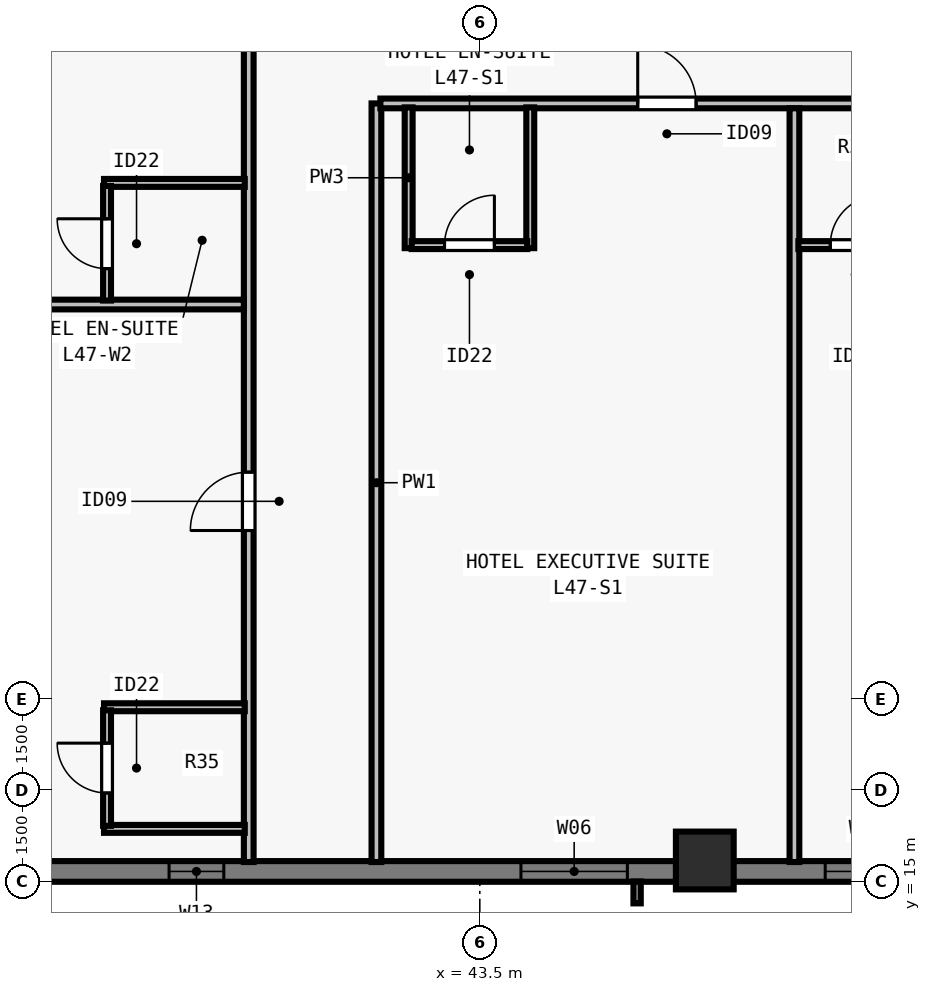
"""IFC4 building model, lengths in metres.
Left out: names, types, materials, properties, quantities, classifications, styles, units other than length and angle.
Written with IfcOpenShell. Run it as: python <this file> out.ifc"""

import sys

from ifc_helpers import new_model, si_unit, direction, frame, frame_2d, origin, origin_2d, place, context, subcontext, project, spatial, rectangle, extrude, element, fill, save


model = new_model("IFC4")
c1 = context("Model", 3, precision=1e-05, world=origin(), true_north=direction((0.0, 1.0)))
c2 = subcontext(c1, "Body", "Model", "MODEL_VIEW")
j1 = project(units=[si_unit("LENGTHUNIT", "METRE"), si_unit("PLANEANGLEUNIT", "RADIAN")], contexts=[c1])
p1 = place(None, origin())
s1 = spatial("IfcSite", under=j1, at=p1, CompositionType="ELEMENT")
p2 = place(p1, origin())
s2 = spatial("IfcBuilding", under=s1, at=p2, CompositionType="ELEMENT")
p3 = place(p2, frame((0.0, 0.0, 172.5)))
s3 = spatial("IfcBuildingStorey", under=s2, at=p3, CompositionType="ELEMENT", Elevation=172.5)
p4 = place(p3, frame((47.2, 15.35, 0.0), z_axis=(0.0, 0.0, 1.0), x_axis=(1.0, 0.0, 0.0)))
e1 = element("IfcColumn", 1, at=p4, inside=s3, PredefinedType="COLUMN", context=c2, shape_type="SweptSolid", body=[
    extrude(rectangle(XDim=0.95, YDim=0.95, at=origin_2d()), origin(), (0.0, 0.0, 1.0), 3.5),
])
p5 = place(p3, frame((72.0, 15.17, 0.0), z_axis=(0.0, 0.0, 1.0), x_axis=(-1.0, 0.0, 0.0)))
e2 = element("IfcWall", 2, at=p5, inside=s3, PredefinedType="SOLIDWALL", context=c2, shape_type="SweptSolid", body=[
    extrude(rectangle(XDim=39.682, YDim=0.34, at=frame_2d((19.841, 0.0))), origin(), (0.0, 0.0, 1.0), 3.28),
])
p6 = place(p5, frame((8.505, 0.0, 0.8)))
e3 = element("IfcOpeningElement", 3, at=p6, cuts=e2, PredefinedType="OPENING", context=c2, shape_type="SweptSolid", body=[
    extrude(rectangle(XDim=1.35, YDim=1.66, at=frame_2d((0.675, 0.83))), frame((0.0, 0.18, 0.0), z_axis=(0.0, -1.0, 0.0), x_axis=(1.0, 0.0, 0.0)), (0.0, 0.0, 1.0), 0.36),
])
p7 = place(p5, frame((11.859, 0.0, 0.8)))
e4 = element("IfcOpeningElement", 4, at=p7, cuts=e2, PredefinedType="OPENING", context=c2, shape_type="SweptSolid", body=[
    extrude(rectangle(XDim=1.75, YDim=1.66, at=frame_2d((0.875, 0.83))), frame((0.0, 0.18, 0.0), z_axis=(0.0, -1.0, 0.0), x_axis=(1.0, 0.0, 0.0)), (0.0, 0.0, 1.0), 0.36),
])
p8 = place(p5, frame((16.062, 0.0, 0.8)))
e5 = element("IfcOpeningElement", 5, at=p8, cuts=e2, PredefinedType="OPENING", context=c2, shape_type="SweptSolid", body=[
    extrude(rectangle(XDim=1.35, YDim=1.66, at=frame_2d((0.675, 0.83))), frame((0.0, 0.18, 0.0), z_axis=(0.0, -1.0, 0.0), x_axis=(1.0, 0.0, 0.0)), (0.0, 0.0, 1.0), 0.36),
])
p9 = place(p5, frame((18.966, 0.0, 0.8)))
e6 = element("IfcOpeningElement", 6, at=p9, cuts=e2, PredefinedType="OPENING", context=c2, shape_type="SweptSolid", body=[
    extrude(rectangle(XDim=1.75, YDim=1.66, at=frame_2d((0.875, 0.83))), frame((0.0, 0.18, 0.0), z_axis=(0.0, -1.0, 0.0), x_axis=(1.0, 0.0, 0.0)), (0.0, 0.0, 1.0), 0.36),
])
p10 = place(p5, frame((21.469, 0.0, 0.8)))
e7 = element("IfcOpeningElement", 7, at=p10, cuts=e2, PredefinedType="OPENING", context=c2, shape_type="SweptSolid", body=[
    extrude(rectangle(XDim=1.35, YDim=1.66, at=frame_2d((0.675, 0.83))), frame((0.0, 0.18, 0.0), z_axis=(0.0, -1.0, 0.0), x_axis=(1.0, 0.0, 0.0)), (0.0, 0.0, 1.0), 0.36),
])
p11 = place(p5, frame((26.073, 0.0, 0.8)))
e8 = element("IfcOpeningElement", 8, at=p11, cuts=e2, PredefinedType="OPENING", context=c2, shape_type="SweptSolid", body=[
    extrude(rectangle(XDim=1.75, YDim=1.66, at=frame_2d((0.875, 0.83))), frame((0.0, 0.18, 0.0), z_axis=(0.0, -1.0, 0.0), x_axis=(1.0, 0.0, 0.0)), (0.0, 0.0, 1.0), 0.36),
])
p12 = place(p5, frame((32.71, 0.0, 0.8)))
e9 = element("IfcOpeningElement", 9, at=p12, cuts=e2, PredefinedType="OPENING", context=c2, shape_type="SweptSolid", body=[
    extrude(rectangle(XDim=0.9, YDim=1.66, at=frame_2d((0.45, 0.83))), frame((0.0, 0.18, 0.0), z_axis=(0.0, -1.0, 0.0), x_axis=(1.0, 0.0, 0.0)), (0.0, 0.0, 1.0), 0.36),
])
p13 = place(p3, frame((39.7, 15.325, 0.0), z_axis=(0.0, 0.0, 1.0), x_axis=(0.0, 1.0, 0.0)))
e10 = element("IfcWall", 10, at=p13, inside=s3, PredefinedType="PARTITIONING", context=c2, shape_type="SweptSolid", body=[
    extrude(rectangle(XDim=47.35, YDim=0.16, at=frame_2d((23.675, 0.0))), origin(), (0.0, 0.0, 1.0), 2.555),
])
p14 = place(p13, frame((5.451, 0.0, 0.0)))
e11 = element("IfcOpeningElement", 11, at=p14, cuts=e10, PredefinedType="OPENING", context=c2, shape_type="SweptSolid", body=[
    extrude(rectangle(XDim=0.96, YDim=2.15, at=frame_2d((0.48, 1.075))), frame((0.0, 0.09, 0.0), z_axis=(0.0, -1.0, 0.0), x_axis=(1.0, 0.0, 0.0)), (0.0, 0.0, 1.0), 0.18),
])
p15 = place(p13, frame((14.783, 0.0, 0.0)))
e12 = element("IfcOpeningElement", 12, at=p15, cuts=e10, PredefinedType="OPENING", context=c2, shape_type="SweptSolid", body=[
    extrude(rectangle(XDim=0.96, YDim=2.15, at=frame_2d((0.48, 1.075))), frame((0.0, 0.09, 0.0), z_axis=(0.0, -1.0, 0.0), x_axis=(1.0, 0.0, 0.0)), (0.0, 0.0, 1.0), 0.18),
])
p16 = place(p13, frame((24.215, 0.0, 0.0)))
e13 = element("IfcOpeningElement", 13, at=p16, cuts=e10, PredefinedType="OPENING", context=c2, shape_type="SweptSolid", body=[
    extrude(rectangle(XDim=0.96, YDim=2.15, at=frame_2d((0.48, 1.075))), frame((0.0, 0.09, 0.0), z_axis=(0.0, -1.0, 0.0), x_axis=(1.0, 0.0, 0.0)), (0.0, 0.0, 1.0), 0.18),
])
p17 = place(p13, frame((33.647, 0.0, 0.0)))
e14 = element("IfcOpeningElement", 14, at=p17, cuts=e10, PredefinedType="OPENING", context=c2, shape_type="SweptSolid", body=[
    extrude(rectangle(XDim=0.96, YDim=2.15, at=frame_2d((0.48, 1.075))), frame((0.0, 0.09, 0.0), z_axis=(0.0, -1.0, 0.0), x_axis=(1.0, 0.0, 0.0)), (0.0, 0.0, 1.0), 0.18),
])
p18 = place(p13, frame((43.258, 0.0, 0.0)))
e15 = element("IfcOpeningElement", 15, at=p18, cuts=e10, PredefinedType="OPENING", context=c2, shape_type="SweptSolid", body=[
    extrude(rectangle(XDim=0.96, YDim=2.15, at=frame_2d((0.48, 1.075))), frame((0.0, 0.09, 0.0), z_axis=(0.0, -1.0, 0.0), x_axis=(1.0, 0.0, 0.0)), (0.0, 0.0, 1.0), 0.18),
])
p19 = place(p3, frame((41.8, 15.325, 0.0), z_axis=(0.0, 0.0, 1.0), x_axis=(0.0, 1.0, 0.0)))
e16 = element("IfcWall", 16, at=p19, inside=s3, PredefinedType="PARTITIONING", context=c2, shape_type="SweptSolid", body=[
    extrude(rectangle(XDim=12.475, YDim=0.16, at=frame_2d((6.238, 0.0))), origin(), (0.0, 0.0, 1.0), 3.28),
])
p20 = place(p3, frame((41.865, 27.8, 0.0), z_axis=(0.0, 0.0, 1.0), x_axis=(1.0, 0.0, 0.0)))
e17 = element("IfcWall", 17, at=p20, inside=s3, PredefinedType="PARTITIONING", context=c2, shape_type="SweptSolid", body=[
    extrude(rectangle(XDim=22.07, YDim=0.16, at=frame_2d((11.035, 0.0))), origin(), (0.0, 0.0, 1.0), 3.28),
])
p21 = place(p20, frame((4.232, 0.0, 0.0)))
e18 = element("IfcOpeningElement", 18, at=p21, cuts=e17, PredefinedType="OPENING", context=c2, shape_type="SweptSolid", body=[
    extrude(rectangle(XDim=0.96, YDim=2.15, at=frame_2d((0.48, 1.075))), frame((0.0, 0.09, 0.0), z_axis=(0.0, -1.0, 0.0), x_axis=(1.0, 0.0, 0.0)), (0.0, 0.0, 1.0), 0.18),
])
p22 = place(p20, frame((11.545, 0.0, 0.0)))
e19 = element("IfcOpeningElement", 19, at=p22, cuts=e17, PredefinedType="OPENING", context=c2, shape_type="SweptSolid", body=[
    extrude(rectangle(XDim=0.96, YDim=2.15, at=frame_2d((0.48, 1.075))), frame((0.0, 0.09, 0.0), z_axis=(0.0, -1.0, 0.0), x_axis=(1.0, 0.0, 0.0)), (0.0, 0.0, 1.0), 0.18),
])
p23 = place(p20, frame((19.168, 0.0, 0.0)))
e20 = element("IfcOpeningElement", 20, at=p23, cuts=e17, PredefinedType="OPENING", context=c2, shape_type="SweptSolid", body=[
    extrude(rectangle(XDim=0.96, YDim=2.15, at=frame_2d((0.48, 1.075))), frame((0.0, 0.09, 0.0), z_axis=(0.0, -1.0, 0.0), x_axis=(1.0, 0.0, 0.0)), (0.0, 0.0, 1.0), 0.18),
])
for number, where, z_axis, x_axis in (
    (21, (42.33, 25.42, 0.0), (0.0, 0.0, 1.0), (0.0, 1.0, 0.0)),
    (22, (44.33, 25.42, 0.0), (0.0, 0.0, 1.0), (0.0, 1.0, 0.0)),
):
    element("IfcWall", number, at=place(p3, frame(where, z_axis=z_axis, x_axis=x_axis)), inside=s3, PredefinedType="PLUMBINGWALL", context=c2, shape_type="SweptSolid", body=[
        extrude(rectangle(XDim=2.315, YDim=0.13, at=frame_2d((1.158, 0.0))), origin(), (0.0, 0.0, 1.0), 3.28),
    ])
p24 = place(p3, frame((42.38, 25.47, 0.0), z_axis=(0.0, 0.0, 1.0), x_axis=(1.0, 0.0, 0.0)))
e23 = element("IfcWall", 23, at=p24, inside=s3, PredefinedType="PLUMBINGWALL", context=c2, shape_type="SweptSolid", body=[
    extrude(rectangle(XDim=1.9, YDim=0.13, at=frame_2d((0.95, 0.0))), origin(), (0.0, 0.0, 1.0), 3.28),
])
p25 = place(p24, frame((0.54, 0.0, 0.0)))
e24 = element("IfcOpeningElement", 24, at=p25, cuts=e23, PredefinedType="OPENING", context=c2, shape_type="SweptSolid", body=[
    extrude(rectangle(XDim=0.82, YDim=2.1, at=frame_2d((0.41, 1.05))), frame((0.0, 0.075, 0.0), z_axis=(0.0, -1.0, 0.0), x_axis=(1.0, 0.0, 0.0)), (0.0, 0.0, 1.0), 0.15),
])
p26 = place(p3, frame((48.674, 15.325, 0.0), z_axis=(0.0, 0.0, 1.0), x_axis=(0.0, 1.0, 0.0)))
e25 = element("IfcWall", 25, at=p26, inside=s3, PredefinedType="PARTITIONING", context=c2, shape_type="SweptSolid", body=[
    extrude(rectangle(XDim=12.395, YDim=0.16, at=frame_2d((6.198, 0.0))), origin(), (0.0, 0.0, 1.0), 2.896),
])
p27 = place(p3, frame((48.739, 25.47, 0.0), z_axis=(0.0, 0.0, 1.0), x_axis=(1.0, 0.0, 0.0)))
e26 = element("IfcWall", 26, at=p27, inside=s3, PredefinedType="PLUMBINGWALL", context=c2, shape_type="SweptSolid", body=[
    extrude(rectangle(XDim=1.885, YDim=0.13, at=frame_2d((0.942, 0.0))), origin(), (0.0, 0.0, 1.0), 3.28),
])
p28 = place(p27, frame((0.525, 0.0, 0.0)))
e27 = element("IfcOpeningElement", 27, at=p28, cuts=e26, PredefinedType="OPENING", context=c2, shape_type="SweptSolid", body=[
    extrude(rectangle(XDim=0.82, YDim=2.1, at=frame_2d((0.41, 1.05))), frame((0.0, 0.075, 0.0), z_axis=(0.0, -1.0, 0.0), x_axis=(1.0, 0.0, 0.0)), (0.0, 0.0, 1.0), 0.15),
])
for number, where, z_axis, x_axis in (
    (28, (37.32, 15.87, 0.0), (0.0, 0.0, 1.0), (1.0, 0.0, 0.0)),
    (29, (37.32, 17.87, 0.0), (0.0, 0.0, 1.0), (1.0, 0.0, 0.0)),
):
    element("IfcWall", number, at=place(p3, frame(where, z_axis=z_axis, x_axis=x_axis)), inside=s3, PredefinedType="PLUMBINGWALL", context=c2, shape_type="SweptSolid", body=[
        extrude(rectangle(XDim=2.315, YDim=0.13, at=frame_2d((1.157, 0.0))), origin(), (0.0, 0.0, 1.0), 3.28),
    ])
p29 = place(p3, frame((37.37, 15.92, 0.0), z_axis=(0.0, 0.0, 1.0), x_axis=(0.0, 1.0, 0.0)))
e30 = element("IfcWall", 30, at=p29, inside=s3, PredefinedType="PLUMBINGWALL", context=c2, shape_type="SweptSolid", body=[
    extrude(rectangle(XDim=1.9, YDim=0.13, at=frame_2d((0.95, 0.0))), origin(), (0.0, 0.0, 1.0), 3.28),
])
p30 = place(p29, frame((0.54, 0.0, 0.0)))
e31 = element("IfcOpeningElement", 31, at=p30, cuts=e30, PredefinedType="OPENING", context=c2, shape_type="SweptSolid", body=[
    extrude(rectangle(XDim=0.82, YDim=2.1, at=frame_2d((0.41, 1.05))), frame((0.0, 0.075, 0.0), z_axis=(0.0, -1.0, 0.0), x_axis=(1.0, 0.0, 0.0)), (0.0, 0.0, 1.0), 0.15),
])
p31 = place(p3, frame((28.325, 24.493, 0.0), z_axis=(0.0, 0.0, 1.0), x_axis=(1.0, 0.0, 0.0)))
e32 = element("IfcWall", 32, at=p31, inside=s3, PredefinedType="PARTITIONING", context=c2, shape_type="SweptSolid", body=[
    extrude(rectangle(XDim=11.295, YDim=0.16, at=frame_2d((5.647, 0.0))), origin(), (0.0, 0.0, 1.0), 2.896),
])
p32 = place(p3, frame((37.32, 26.493, 0.0), z_axis=(0.0, 0.0, 1.0), x_axis=(1.0, 0.0, 0.0)))
e33 = element("IfcWall", 33, at=p32, inside=s3, PredefinedType="PLUMBINGWALL", context=c2, shape_type="SweptSolid", body=[
    extrude(rectangle(XDim=2.315, YDim=0.13, at=frame_2d((1.157, 0.0))), origin(), (0.0, 0.0, 1.0), 2.896),
])
p33 = place(p3, frame((37.37, 24.558, 0.0), z_axis=(0.0, 0.0, 1.0), x_axis=(0.0, 1.0, 0.0)))
e34 = element("IfcWall", 34, at=p33, inside=s3, PredefinedType="PLUMBINGWALL", context=c2, shape_type="SweptSolid", body=[
    extrude(rectangle(XDim=1.885, YDim=0.13, at=frame_2d((0.942, 0.0))), origin(), (0.0, 0.0, 1.0), 3.28),
])
p34 = place(p33, frame((0.525, 0.0, 0.0)))
e35 = element("IfcOpeningElement", 35, at=p34, cuts=e34, PredefinedType="OPENING", context=c2, shape_type="SweptSolid", body=[
    extrude(rectangle(XDim=0.82, YDim=2.1, at=frame_2d((0.41, 1.05))), frame((0.0, 0.075, 0.0), z_axis=(0.0, -1.0, 0.0), x_axis=(1.0, 0.0, 0.0)), (0.0, 0.0, 1.0), 0.15),
])
p35 = place(p10, origin())
e36 = element("IfcWindow", 36, at=p35, inside=s3, PartitioningType="SINGLE_PANEL", PredefinedType="WINDOW", context=c2, shape_type="SweptSolid", body=[
    extrude(rectangle(XDim=1.35, YDim=1.66, at=frame_2d((0.675, 0.83))), frame((0.0, -0.05, 0.0), z_axis=(0.0, -1.0, 0.0), x_axis=(1.0, 0.0, 0.0)), (0.0, 0.0, 1.0), 0.06),
])
fill(e7, e36)
p36 = place(p11, origin())
e37 = element("IfcWindow", 37, at=p36, inside=s3, PartitioningType="SINGLE_PANEL", PredefinedType="WINDOW", context=c2, shape_type="SweptSolid", body=[
    extrude(rectangle(XDim=1.75, YDim=1.66, at=frame_2d((0.875, 0.83))), frame((0.0, -0.05, 0.0), z_axis=(0.0, -1.0, 0.0), x_axis=(1.0, 0.0, 0.0)), (0.0, 0.0, 1.0), 0.06),
])
fill(e8, e37)
p37 = place(p12, origin())
e38 = element("IfcWindow", 38, at=p37, inside=s3, PartitioningType="SINGLE_PANEL", PredefinedType="WINDOW", context=c2, shape_type="SweptSolid", body=[
    extrude(rectangle(XDim=0.9, YDim=1.66, at=frame_2d((0.45, 0.83))), frame((0.0, -0.04, 0.0), z_axis=(0.0, -1.0, 0.0), x_axis=(1.0, 0.0, 0.0)), (0.0, 0.0, 1.0), 0.06),
])
fill(e9, e38)
p38 = place(p25, origin())
e39 = element("IfcDoor", 39, at=p38, inside=s3, OperationType="SINGLE_SWING_RIGHT", PredefinedType="DOOR", context=c2, shape_type="SweptSolid", body=[
    extrude(rectangle(XDim=0.82, YDim=2.1, at=frame_2d((0.41, 1.05))), frame((0.0, 0.025, 0.0), z_axis=(0.0, -1.0, 0.0), x_axis=(1.0, 0.0, 0.0)), (0.0, 0.0, 1.0), 0.05),
])
fill(e24, e39)
p39 = place(p21, origin())
e40 = element("IfcDoor", 40, at=p39, inside=s3, OperationType="SINGLE_SWING_LEFT", PredefinedType="DOOR", context=c2, shape_type="SweptSolid", body=[
    extrude(rectangle(XDim=0.96, YDim=2.15, at=frame_2d((0.48, 1.075))), frame((0.0, 0.025, 0.0), z_axis=(0.0, -1.0, 0.0), x_axis=(1.0, 0.0, 0.0)), (0.0, 0.0, 1.0), 0.05),
])
fill(e18, e40)
p40 = place(p28, origin())
e41 = element("IfcDoor", 41, at=p40, inside=s3, OperationType="SINGLE_SWING_RIGHT", PredefinedType="DOOR", context=c2, shape_type="SweptSolid", body=[
    extrude(rectangle(XDim=0.82, YDim=2.1, at=frame_2d((0.41, 1.05))), frame((0.0, 0.025, 0.0), z_axis=(0.0, -1.0, 0.0), x_axis=(1.0, 0.0, 0.0)), (0.0, 0.0, 1.0), 0.05),
])
fill(e27, e41)
p41 = place(p30, origin())
e42 = element("IfcDoor", 42, at=p41, inside=s3, OperationType="SINGLE_SWING_RIGHT", PredefinedType="DOOR", context=c2, shape_type="SweptSolid", body=[
    extrude(rectangle(XDim=0.82, YDim=2.1, at=frame_2d((0.41, 1.05))), frame((0.0, 0.025, 0.0), z_axis=(0.0, -1.0, 0.0), x_axis=(1.0, 0.0, 0.0)), (0.0, 0.0, 1.0), 0.05),
])
fill(e31, e42)
p42 = place(p14, origin())
e43 = element("IfcDoor", 43, at=p42, inside=s3, OperationType="SINGLE_SWING_LEFT", PredefinedType="DOOR", context=c2, shape_type="SweptSolid", body=[
    extrude(rectangle(XDim=0.96, YDim=2.15, at=frame_2d((0.48, 1.075))), frame((0.0, 0.025, 0.0), z_axis=(0.0, -1.0, 0.0), x_axis=(1.0, 0.0, 0.0)), (0.0, 0.0, 1.0), 0.05),
])
fill(e11, e43)
p43 = place(p34, origin())
e44 = element("IfcDoor", 44, at=p43, inside=s3, OperationType="SINGLE_SWING_RIGHT", PredefinedType="DOOR", context=c2, shape_type="SweptSolid", body=[
    extrude(rectangle(XDim=0.82, YDim=2.1, at=frame_2d((0.41, 1.05))), frame((0.0, 0.025, 0.0), z_axis=(0.0, -1.0, 0.0), x_axis=(1.0, 0.0, 0.0)), (0.0, 0.0, 1.0), 0.05),
])
fill(e35, e44)
save(model, sys.argv[1])
